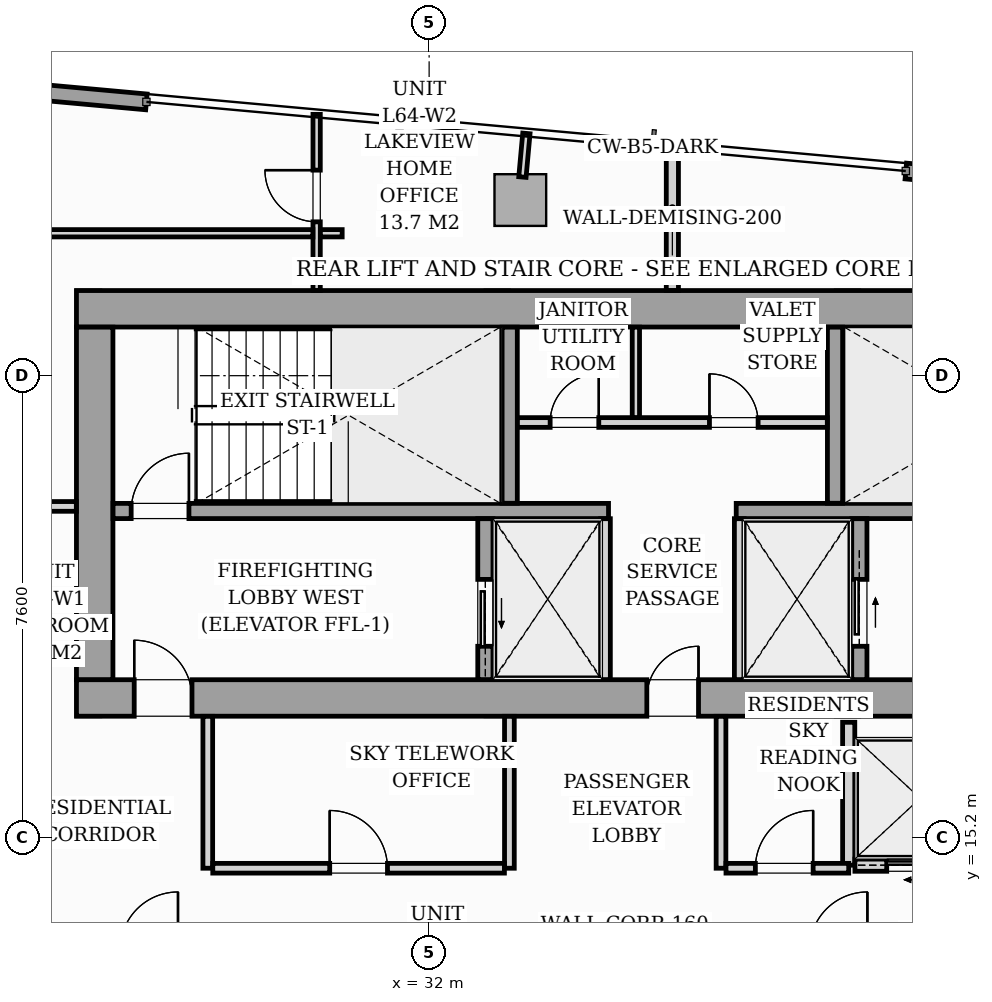
"""IFC4 building model, lengths in metres.
Left out: names, types, materials, properties, quantities, classifications, styles, units other than length and angle.
Written with IfcOpenShell. Run it as: python <this file> out.ifc"""

import sys

from ifc_helpers import new_model, si_unit, direction, frame, frame_2d, origin, origin_2d, place, context, subcontext, project, spatial, rectangle, i_section, extrude, source, transform, mapped, element, fill, save


model = new_model("IFC4")
c1 = context("Model", 3, precision=1e-05, world=origin(), true_north=direction((0.0, 1.0)))
c2 = subcontext(c1, "Body", "Model", "MODEL_VIEW")
j1 = project(units=[si_unit("LENGTHUNIT", "METRE"), si_unit("PLANEANGLEUNIT", "RADIAN")], contexts=[c1])
p1 = place(None, origin())
s1 = spatial("IfcSite", under=j1, at=p1, CompositionType="ELEMENT")
p2 = place(p1, origin())
s2 = spatial("IfcBuilding", under=s1, at=p2, CompositionType="ELEMENT")
p3 = place(p2, frame((0.0, 0.0, 223.2)))
s3 = spatial("IfcBuildingStorey", under=s2, at=p3, CompositionType="ELEMENT", Elevation=223.2)
m1 = source(origin(), c2, "Body", "SweptSolid", [
    extrude(i_section(OverallWidth=0.409, OverallDepth=0.425, WebThickness=0.033, FlangeThickness=0.052, FilletRadius=0.018, at=origin_2d()), origin(), (0.0, 0.0, 1.0), 3.296),
])
for number, where, z_axis, x_axis in (
    (1, (26.4, 17.4, 0.002), (0.0, 0.0, 1.0), (1.0, 0.0, 0.0)),
    (2, (33.12, 17.4, 0.002), (0.0, 0.0, 1.0), (1.0, 0.0, 0.0)),
    (3, (38.88, 17.4, 0.002), (0.0, 0.0, 1.0), (1.0, 0.0, 0.0)),
    (4, (26.4, 24.0, 0.002), (0.0, 0.0, 1.0), (1.0, 0.0, 0.0)),
    (5, (33.12, 24.0, 0.002), (0.0, 0.0, 1.0), (1.0, 0.0, 0.0)),
    (6, (38.88, 24.0, 0.002), (0.0, 0.0, 1.0), (1.0, 0.0, 0.0)),
):
    element("IfcColumn", number, at=place(p3, frame(where, z_axis=z_axis, x_axis=x_axis)), inside=s3, PredefinedType="PILASTER", context=c2, shape_type="MappedRepresentation", body=[
        mapped(m1, transform((0.0, 0.0, 0.0), scale=1.0)),
    ])
m2 = source(origin(), c2, "Body", "SweptSolid", [
    extrude(rectangle(XDim=0.85, YDim=0.85, at=origin_2d()), origin(), (0.0, 0.0, 1.0), 3.296),
])
p4 = place(p3, frame((33.5, 25.688, 0.002), z_axis=(0.0, 0.0, 1.0), x_axis=(0.995884398616, -0.090632580198, 0.0)))
e7 = element("IfcColumn", 7, at=p4, inside=s3, PredefinedType="COLUMN", context=c2, shape_type="MappedRepresentation", body=[
    mapped(m2, transform((0.0, 0.0, 0.0), scale=1.0)),
])
p5 = place(p3, frame((12.781, 28.628, 0.0), z_axis=(0.0, 0.0, 1.0), x_axis=(0.995884584572, -0.090630536861, 0.0)))
e8 = element("IfcWall", 8, at=p5, inside=s3, PredefinedType="STANDARD", context=c2, shape_type="SweptSolid", body=[
    extrude(rectangle(XDim=14.63, YDim=0.26, at=frame_2d((7.315, 0.0))), origin(), (0.0, 0.0, 1.0), 3.04),
])
p6 = place(p5, frame((4.159, 0.0, 0.0)))
e9 = element("IfcOpeningElement", 9, at=p6, cuts=e8, PredefinedType="OPENING", context=c2, shape_type="SweptSolid", body=[
    extrude(rectangle(XDim=1.8, YDim=2.06, at=frame_2d((0.9, 1.03))), frame((0.0, 0.14, 0.0), z_axis=(0.0, -1.0, 0.0), x_axis=(1.0, 0.0, 0.0)), (0.0, 0.0, 1.0), 0.28),
])
p7 = place(p5, frame((7.9, 0.0, 0.65)))
e10 = element("IfcOpeningElement", 10, at=p7, cuts=e8, PredefinedType="OPENING", context=c2, shape_type="SweptSolid", body=[
    extrude(rectangle(XDim=1.6, YDim=1.5, at=frame_2d((0.8, 0.75))), frame((0.0, 0.14, 0.0), z_axis=(0.0, -1.0, 0.0), x_axis=(1.0, 0.0, 0.0)), (0.0, 0.0, 1.0), 0.28),
])
p8 = place(p3, frame((39.839, 26.166, 0.0), z_axis=(0.0, 0.0, 1.0), x_axis=(0.995884447498, -0.090632043071, 0.0)))
e11 = element("IfcWall", 11, at=p8, inside=s3, PredefinedType="STANDARD", context=c2, shape_type="SweptSolid", body=[
    extrude(rectangle(XDim=14.63, YDim=0.26, at=frame_2d((7.315, 0.0))), origin(), (0.0, 0.0, 1.0), 3.04),
])
p9 = place(p8, frame((7.57, 0.0, 0.0)))
e12 = element("IfcOpeningElement", 12, at=p9, cuts=e11, PredefinedType="OPENING", context=c2, shape_type="SweptSolid", body=[
    extrude(rectangle(XDim=1.8, YDim=2.06, at=frame_2d((0.9, 1.03))), frame((0.0, 0.14, 0.0), z_axis=(0.0, -1.0, 0.0), x_axis=(1.0, 0.0, 0.0)), (0.0, 0.0, 1.0), 0.28),
])
p10 = place(p8, frame((0.7, 0.0, 0.65)))
e13 = element("IfcOpeningElement", 13, at=p10, cuts=e11, PredefinedType="OPENING", context=c2, shape_type="SweptSolid", body=[
    extrude(rectangle(XDim=1.6, YDim=1.5, at=frame_2d((0.8, 0.75))), frame((0.0, 0.14, 0.0), z_axis=(0.0, -1.0, 0.0), x_axis=(1.0, 0.0, 0.0)), (0.0, 0.0, 1.0), 0.28),
])
p11 = place(p3, frame((26.2, 17.5, 0.0), z_axis=(0.0, 0.0, 1.0), x_axis=(1.0, 0.0, 0.0)))
e14 = element("IfcWall", 14, at=p11, inside=s3, PredefinedType="SHEAR", context=c2, shape_type="SweptSolid", body=[
    extrude(rectangle(XDim=19.6, YDim=0.6, at=frame_2d((9.8, 0.0))), origin(), (0.0, 0.0, 1.0), 3.3),
])
p12 = place(p11, frame((0.95, 0.0, 0.0)))
e15 = element("IfcOpeningElement", 15, at=p12, cuts=e14, PredefinedType="OPENING", context=c2, shape_type="SweptSolid", body=[
    extrude(rectangle(XDim=0.95, YDim=2.06, at=frame_2d((0.475, 1.03))), frame((0.0, 0.31, 0.0), z_axis=(0.0, -1.0, 0.0), x_axis=(1.0, 0.0, 0.0)), (0.0, 0.0, 1.0), 0.62),
])
p13 = place(p11, frame((9.38, 0.0, 0.0)))
e16 = element("IfcOpeningElement", 16, at=p13, cuts=e14, PredefinedType="OPENING", context=c2, shape_type="SweptSolid", body=[
    extrude(rectangle(XDim=0.85, YDim=2.0, at=frame_2d((0.425, 1.0))), frame((0.0, 0.31, 0.0), z_axis=(0.0, -1.0, 0.0), x_axis=(1.0, 0.0, 0.0)), (0.0, 0.0, 1.0), 0.62),
])
p14 = place(p11, frame((17.55, 0.0, 0.0)))
e17 = element("IfcOpeningElement", 17, at=p14, cuts=e14, PredefinedType="OPENING", context=c2, shape_type="SweptSolid", body=[
    extrude(rectangle(XDim=0.95, YDim=2.06, at=frame_2d((0.475, 1.03))), frame((0.0, 0.31, 0.0), z_axis=(0.0, -1.0, 0.0), x_axis=(1.0, 0.0, 0.0)), (0.0, 0.0, 1.0), 0.62),
])
p15 = place(p3, frame((26.2, 23.9, 0.0), z_axis=(0.0, 0.0, 1.0), x_axis=(1.0, 0.0, 0.0)))
e18 = element("IfcWall", 18, at=p15, inside=s3, PredefinedType="SHEAR", context=c2, shape_type="SweptSolid", body=[
    extrude(rectangle(XDim=19.6, YDim=0.6, at=frame_2d((9.8, 0.0))), origin(), (0.0, 0.0, 1.0), 3.3),
])
p16 = place(p3, frame((26.5, 17.802, 0.0), z_axis=(0.0, 0.0, 1.0), x_axis=(0.0, 1.0, 0.0)))
e19 = element("IfcWall", 19, at=p16, inside=s3, PredefinedType="SHEAR", context=c2, shape_type="SweptSolid", body=[
    extrude(rectangle(XDim=5.796, YDim=0.6, at=frame_2d((2.898, 0.0))), origin(), (0.0, 0.0, 1.0), 3.3),
])
p17 = place(p3, frame((26.802, 20.575, 0.0), z_axis=(0.0, 0.0, 1.0), x_axis=(1.0, 0.0, 0.0)))
e20 = element("IfcWall", 20, at=p17, inside=s3, PredefinedType="SOLIDWALL", context=c2, shape_type="SweptSolid", body=[
    extrude(rectangle(XDim=8.148, YDim=0.25, at=frame_2d((4.074, 0.0))), origin(), (0.0, 0.0, 1.0), 3.3),
])
p18 = place(p17, frame((0.298, 0.0, 0.0)))
e21 = element("IfcOpeningElement", 21, at=p18, cuts=e20, PredefinedType="OPENING", context=c2, shape_type="SweptSolid", body=[
    extrude(rectangle(XDim=0.95, YDim=2.06, at=frame_2d((0.475, 1.03))), frame((0.0, 0.135, 0.0), z_axis=(0.0, -1.0, 0.0), x_axis=(1.0, 0.0, 0.0)), (0.0, 0.0, 1.0), 0.27),
])
p19 = place(p3, frame((37.05, 20.575, 0.0), z_axis=(0.0, 0.0, 1.0), x_axis=(1.0, 0.0, 0.0)))
e22 = element("IfcWall", 22, at=p19, inside=s3, PredefinedType="SOLIDWALL", context=c2, shape_type="SweptSolid", body=[
    extrude(rectangle(XDim=8.148, YDim=0.25, at=frame_2d((4.074, 0.0))), origin(), (0.0, 0.0, 1.0), 3.3),
])
p20 = place(p19, frame((6.6, 0.0, 0.0)))
e23 = element("IfcOpeningElement", 23, at=p20, cuts=e22, PredefinedType="OPENING", context=c2, shape_type="SweptSolid", body=[
    extrude(rectangle(XDim=0.95, YDim=2.06, at=frame_2d((0.475, 1.03))), frame((0.0, 0.135, 0.0), z_axis=(0.0, -1.0, 0.0), x_axis=(1.0, 0.0, 0.0)), (0.0, 0.0, 1.0), 0.27),
])
for number, where, z_axis, x_axis in (
    (24, (33.325, 20.702, 0.0), (0.0, 0.0, 1.0), (0.0, 1.0, 0.0)),
    (25, (38.675, 20.702, 0.0), (0.0, 0.0, 1.0), (0.0, 1.0, 0.0)),
):
    element("IfcWall", number, at=place(p3, frame(where, z_axis=z_axis, x_axis=x_axis)), inside=s3, PredefinedType="SOLIDWALL", context=c2, shape_type="SweptSolid", body=[
        extrude(rectangle(XDim=2.896, YDim=0.25, at=frame_2d((1.448, 0.0))), origin(), (0.0, 0.0, 1.0), 3.3),
    ])
p21 = place(p3, frame((32.925, 17.802, 0.0), z_axis=(0.0, 0.0, 1.0), x_axis=(0.0, 1.0, 0.0)))
e26 = element("IfcWall", 26, at=p21, inside=s3, PredefinedType="SOLIDWALL", context=c2, shape_type="SweptSolid", body=[
    extrude(rectangle(XDim=2.646, YDim=0.25, at=frame_2d((1.323, 0.0))), origin(), (0.0, 0.0, 1.0), 3.3),
])
p22 = place(p21, frame((0.548, 0.0, 0.0)))
e27 = element("IfcOpeningElement", 27, at=p22, cuts=e26, PredefinedType="OPENING", context=c2, shape_type="SweptSolid", body=[
    extrude(rectangle(XDim=1.1, YDim=2.08, at=frame_2d((0.55, 1.04))), frame((0.0, 0.135, 0.0), z_axis=(0.0, -1.0, 0.0), x_axis=(1.0, 0.0, 0.0)), (0.0, 0.0, 1.0), 0.27),
])
for number, where, z_axis, x_axis in (
    (28, (34.9, 17.802, 0.0), (0.0, 0.0, 1.0), (0.0, 1.0, 0.0)),
    (29, (37.1, 17.802, 0.0), (0.0, 0.0, 1.0), (0.0, 1.0, 0.0)),
):
    element("IfcWall", number, at=place(p3, frame(where, z_axis=z_axis, x_axis=x_axis)), inside=s3, PredefinedType="PARTITIONING", context=c2, shape_type="SweptSolid", body=[
        extrude(rectangle(XDim=2.646, YDim=0.16, at=frame_2d((1.323, 0.0))), origin(), (0.0, 0.0, 1.0), 3.04),
    ])
p23 = place(p3, frame((39.075, 17.802, 0.0), z_axis=(0.0, 0.0, 1.0), x_axis=(0.0, 1.0, 0.0)))
e30 = element("IfcWall", 30, at=p23, inside=s3, PredefinedType="SOLIDWALL", context=c2, shape_type="SweptSolid", body=[
    extrude(rectangle(XDim=2.646, YDim=0.25, at=frame_2d((1.323, 0.0))), origin(), (0.0, 0.0, 1.0), 3.3),
])
p24 = place(p23, frame((0.548, 0.0, 0.0)))
e31 = element("IfcOpeningElement", 31, at=p24, cuts=e30, PredefinedType="OPENING", context=c2, shape_type="SweptSolid", body=[
    extrude(rectangle(XDim=1.1, YDim=2.08, at=frame_2d((0.55, 1.04))), frame((0.0, 0.135, 0.0), z_axis=(0.0, -1.0, 0.0), x_axis=(1.0, 0.0, 0.0)), (0.0, 0.0, 1.0), 0.27),
])
p25 = place(p3, frame((33.452, 22.03, 0.0), z_axis=(0.0, 0.0, 1.0), x_axis=(1.0, 0.0, 0.0)))
e32 = element("IfcWall", 32, at=p25, inside=s3, PredefinedType="PARTITIONING", context=c2, shape_type="SweptSolid", body=[
    extrude(rectangle(XDim=5.096, YDim=0.16, at=frame_2d((2.548, 0.0))), origin(), (0.0, 0.0, 1.0), 3.04),
])
p26 = place(p25, frame((0.538, 0.0, 0.0)))
e33 = element("IfcOpeningElement", 33, at=p26, cuts=e32, PredefinedType="OPENING", context=c2, shape_type="SweptSolid", body=[
    extrude(rectangle(XDim=0.8, YDim=2.05, at=frame_2d((0.4, 1.025))), frame((0.0, 0.09, 0.0), z_axis=(0.0, -1.0, 0.0), x_axis=(1.0, 0.0, 0.0)), (0.0, 0.0, 1.0), 0.18),
])
p27 = place(p25, frame((3.158, 0.0, 0.0)))
e34 = element("IfcOpeningElement", 34, at=p27, cuts=e32, PredefinedType="OPENING", context=c2, shape_type="SweptSolid", body=[
    extrude(rectangle(XDim=0.8, YDim=2.05, at=frame_2d((0.4, 1.025))), frame((0.0, 0.09, 0.0), z_axis=(0.0, -1.0, 0.0), x_axis=(1.0, 0.0, 0.0)), (0.0, 0.0, 1.0), 0.18),
])
p28 = place(p3, frame((35.4, 22.112, 0.0), z_axis=(0.0, 0.0, 1.0), x_axis=(0.0, 1.0, 0.0)))
e35 = element("IfcWall", 35, at=p28, inside=s3, PredefinedType="PARTITIONING", context=c2, shape_type="SweptSolid", body=[
    extrude(rectangle(XDim=1.486, YDim=0.12, at=frame_2d((0.743, 0.0))), origin(), (0.0, 0.0, 1.0), 3.04),
])
p29 = place(p3, frame((38.9, 14.75, 0.0), z_axis=(0.0, 0.0, 1.0), x_axis=(0.0, 1.0, 0.0)))
e36 = element("IfcWall", 36, at=p29, inside=s3, PredefinedType="PARTITIONING", context=c2, shape_type="SweptSolid", body=[
    extrude(rectangle(XDim=2.35, YDim=0.2, at=frame_2d((1.175, 0.0))), origin(), (0.0, 0.0, 1.0), 3.04),
])
p30 = place(p3, frame((39.002, 14.75, 0.0), z_axis=(0.0, 0.0, 1.0), x_axis=(1.0, 0.0, 0.0)))
e37 = element("IfcWall", 37, at=p30, inside=s3, PredefinedType="PARTITIONING", context=c2, shape_type="SweptSolid", body=[
    extrude(rectangle(XDim=2.146, YDim=0.2, at=frame_2d((1.073, 0.0))), origin(), (0.0, 0.0, 1.0), 3.04),
])
p31 = place(p30, frame((0.523, 0.0, 0.0)))
e38 = element("IfcOpeningElement", 38, at=p31, cuts=e37, PredefinedType="OPENING", context=c2, shape_type="SweptSolid", body=[
    extrude(rectangle(XDim=1.05, YDim=2.08, at=frame_2d((0.525, 1.04))), frame((0.0, 0.11, 0.0), z_axis=(0.0, -1.0, 0.0), x_axis=(1.0, 0.0, 0.0)), (0.0, 0.0, 1.0), 0.22),
])
p32 = place(p3, frame((36.0, 24.202, 0.0), z_axis=(0.0, 0.0, 1.0), x_axis=(0.0, 1.0, 0.0)))
e39 = element("IfcWall", 39, at=p32, inside=s3, PredefinedType="PARTITIONING", context=c2, shape_type="SweptSolid", body=[
    extrude(rectangle(XDim=2.363, YDim=0.2, at=frame_2d((1.182, 0.0))), origin(), (0.0, 0.0, 1.0), 3.04),
])
p33 = place(p3, frame((24.632, 20.65, 0.0), z_axis=(0.0, 0.0, 1.0), x_axis=(1.0, 0.0, 0.0)))
e40 = element("IfcWall", 40, at=p33, inside=s3, PredefinedType="PARTITIONING", context=c2, shape_type="SweptSolid", body=[
    extrude(rectangle(XDim=1.566, YDim=0.16, at=frame_2d((0.783, 0.0))), origin(), (0.0, 0.0, 1.0), 3.04),
])
p34 = place(p3, frame((30.15, 24.202, 0.0), z_axis=(0.0, 0.0, 1.0), x_axis=(0.0, 1.0, 0.0)))
e41 = element("IfcWall", 41, at=p34, inside=s3, PredefinedType="PARTITIONING", context=c2, shape_type="SweptSolid", body=[
    extrude(rectangle(XDim=2.896, YDim=0.12, at=frame_2d((1.448, 0.0))), origin(), (0.0, 0.0, 1.0), 3.04),
])
p35 = place(p34, frame((1.128, 0.0, 0.0)))
e42 = element("IfcOpeningElement", 42, at=p35, cuts=e41, PredefinedType="OPENING", context=c2, shape_type="SweptSolid", body=[
    extrude(rectangle(XDim=0.85, YDim=2.05, at=frame_2d((0.425, 1.025))), frame((0.0, 0.07, 0.0), z_axis=(0.0, -1.0, 0.0), x_axis=(1.0, 0.0, 0.0)), (0.0, 0.0, 1.0), 0.14),
])
p36 = place(p3, frame((20.107, 25.142, 0.0), z_axis=(0.0, 0.0, 1.0), x_axis=(1.0, 0.0, 0.0)))
e43 = element("IfcWall", 43, at=p36, inside=s3, PredefinedType="PARTITIONING", context=c2, shape_type="SweptSolid", body=[
    extrude(rectangle(XDim=9.981, YDim=0.12, at=frame_2d((4.99, 0.0))), origin(), (0.0, 0.0, 1.0), 3.04),
])
p37 = place(p36, frame((4.526, 0.0, 0.0)))
e44 = element("IfcOpeningElement", 44, at=p37, cuts=e43, PredefinedType="OPENING", context=c2, shape_type="SweptSolid", body=[
    extrude(rectangle(XDim=0.85, YDim=2.05, at=frame_2d((0.425, 1.025))), frame((0.0, 0.07, 0.0), z_axis=(0.0, -1.0, 0.0), x_axis=(1.0, 0.0, 0.0)), (0.0, 0.0, 1.0), 0.14),
])
p38 = place(p3, frame((30.212, 25.142, 0.0), z_axis=(0.0, 0.0, 1.0), x_axis=(1.0, 0.0, 0.0)))
e45 = element("IfcWall", 45, at=p38, inside=s3, PredefinedType="PARTITIONING", context=c2, shape_type="SweptSolid", body=[
    extrude(rectangle(XDim=0.358, YDim=0.12, at=frame_2d((0.179, 0.0))), origin(), (0.0, 0.0, 1.0), 3.04),
])
for number, where, z_axis, x_axis in (
    (46, (28.36, 14.7, 0.0), (0.0, 0.0, 1.0), (0.0, 1.0, 0.0)),
    (47, (33.32, 14.7, 0.0), (0.0, 0.0, 1.0), (0.0, 1.0, 0.0)),
):
    element("IfcWall", number, at=place(p3, frame(where, z_axis=z_axis, x_axis=x_axis)), inside=s3, PredefinedType="PARTITIONING", context=c2, shape_type="SweptSolid", body=[
        extrude(rectangle(XDim=2.498, YDim=0.16, at=frame_2d((1.249, 0.0))), origin(), (0.0, 0.0, 1.0), 3.04),
    ])
p39 = place(p3, frame((28.442, 14.7, 0.0), z_axis=(0.0, 0.0, 1.0), x_axis=(1.0, 0.0, 0.0)))
e48 = element("IfcWall", 48, at=p39, inside=s3, PredefinedType="PARTITIONING", context=c2, shape_type="SweptSolid", body=[
    extrude(rectangle(XDim=4.796, YDim=0.16, at=frame_2d((2.398, 0.0))), origin(), (0.0, 0.0, 1.0), 2.596),
])
p40 = place(p39, frame((1.923, 0.0, 0.0)))
e49 = element("IfcOpeningElement", 49, at=p40, cuts=e48, PredefinedType="OPENING", context=c2, shape_type="SweptSolid", body=[
    extrude(rectangle(XDim=0.95, YDim=2.06, at=frame_2d((0.475, 1.03))), frame((0.0, 0.09, 0.0), z_axis=(0.0, -1.0, 0.0), x_axis=(1.0, 0.0, 0.0)), (0.0, 0.0, 1.0), 0.18),
])
p41 = place(p3, frame((36.8, 14.7, 0.0), z_axis=(0.0, 0.0, 1.0), x_axis=(0.0, 1.0, 0.0)))
e50 = element("IfcWall", 50, at=p41, inside=s3, PredefinedType="PARTITIONING", context=c2, shape_type="SweptSolid", body=[
    extrude(rectangle(XDim=2.498, YDim=0.16, at=frame_2d((1.249, 0.0))), origin(), (0.0, 0.0, 1.0), 3.04),
])
p42 = place(p3, frame((36.882, 14.7, 0.0), z_axis=(0.0, 0.0, 1.0), x_axis=(1.0, 0.0, 0.0)))
e51 = element("IfcWall", 51, at=p42, inside=s3, PredefinedType="PARTITIONING", context=c2, shape_type="SweptSolid", body=[
    extrude(rectangle(XDim=2.018, YDim=0.16, at=frame_2d((1.009, 0.0))), origin(), (0.0, 0.0, 1.0), 3.04),
])
p43 = place(p42, frame((0.483, 0.0, 0.0)))
e52 = element("IfcOpeningElement", 52, at=p43, cuts=e51, PredefinedType="OPENING", context=c2, shape_type="SweptSolid", body=[
    extrude(rectangle(XDim=0.95, YDim=2.06, at=frame_2d((0.475, 1.03))), frame((0.0, 0.09, 0.0), z_axis=(0.0, -1.0, 0.0), x_axis=(1.0, 0.0, 0.0)), (0.0, 0.0, 1.0), 0.18),
])
p44 = place(p3, frame((33.534, 26.067, 0.0), z_axis=(0.0, 0.0, 1.0), x_axis=(0.090535746043, 0.995893206468, 0.0)))
e53 = element("IfcWall", 53, at=p44, inside=s3, PredefinedType="PARTITIONING", context=c2, shape_type="SweptSolid", body=[
    extrude(rectangle(XDim=0.72, YDim=0.12, at=frame_2d((0.36, 0.0))), origin(), (0.0, 0.0, 1.0), 3.04),
])
m3 = source(origin(), c2, "Body", "SweptSolid", [
    extrude(rectangle(XDim=0.95, YDim=2.06, at=frame_2d((0.475, 1.03))), frame((0.0, 0.025, 0.0), z_axis=(0.0, -1.0, 0.0), x_axis=(1.0, 0.0, 0.0)), (0.0, 0.0, 1.0), 0.05),
])
p45 = place(p12, origin())
e54 = element("IfcDoor", 54, at=p45, inside=s3, OperationType="SINGLE_SWING_LEFT", PredefinedType="DOOR", context=c2, shape_type="MappedRepresentation", body=[
    mapped(m3, transform((0.0, 0.0, 0.0), scale=1.0)),
])
fill(e15, e54)
m4 = source(origin(), c2, "Body", "SweptSolid", [
    extrude(rectangle(XDim=0.85, YDim=2.0, at=frame_2d((0.425, 1.0))), frame((0.0, 0.025, 0.0), z_axis=(0.0, -1.0, 0.0), x_axis=(1.0, 0.0, 0.0)), (0.0, 0.0, 1.0), 0.05),
])
p46 = place(p13, origin())
e55 = element("IfcDoor", 55, at=p46, inside=s3, OperationType="SINGLE_SWING_RIGHT", PredefinedType="DOOR", context=c2, shape_type="MappedRepresentation", body=[
    mapped(m4, transform((0.0, 0.0, 0.0), scale=1.0)),
])
fill(e16, e55)
p47 = place(p18, origin())
e56 = element("IfcDoor", 56, at=p47, inside=s3, OperationType="SINGLE_SWING_RIGHT", PredefinedType="DOOR", context=c2, shape_type="MappedRepresentation", body=[
    mapped(m3, transform((0.0, 0.0, 0.0), scale=1.0)),
])
fill(e21, e56)
m5 = source(origin(), c2, "Body", "SweptSolid", [
    extrude(rectangle(XDim=1.1, YDim=2.08, at=frame_2d((0.55, 1.04))), frame((0.0, 0.025, 0.0), z_axis=(0.0, -1.0, 0.0), x_axis=(1.0, 0.0, 0.0)), (0.0, 0.0, 1.0), 0.05),
])
p48 = place(p22, origin())
e57 = element("IfcDoor", 57, at=p48, inside=s3, OperationType="SLIDING_TO_LEFT", PredefinedType="DOOR", context=c2, shape_type="MappedRepresentation", body=[
    mapped(m5, transform((0.0, 0.0, 0.0), scale=1.0)),
])
fill(e27, e57)
p49 = place(p24, origin())
e58 = element("IfcDoor", 58, at=p49, inside=s3, OperationType="SLIDING_TO_RIGHT", PredefinedType="DOOR", context=c2, shape_type="MappedRepresentation", body=[
    mapped(m5, transform((0.0, 0.0, 0.0), scale=1.0)),
])
fill(e31, e58)
m6 = source(origin(), c2, "Body", "SweptSolid", [
    extrude(rectangle(XDim=0.8, YDim=2.05, at=frame_2d((0.4, 1.025))), frame((0.0, 0.025, 0.0), z_axis=(0.0, -1.0, 0.0), x_axis=(1.0, 0.0, 0.0)), (0.0, 0.0, 1.0), 0.05),
])
p50 = place(p26, origin())
e59 = element("IfcDoor", 59, at=p50, inside=s3, OperationType="SINGLE_SWING_RIGHT", PredefinedType="DOOR", context=c2, shape_type="MappedRepresentation", body=[
    mapped(m6, transform((0.0, 0.0, 0.0), scale=1.0)),
])
fill(e33, e59)
p51 = place(p27, origin())
e60 = element("IfcDoor", 60, at=p51, inside=s3, OperationType="SINGLE_SWING_LEFT", PredefinedType="DOOR", context=c2, shape_type="MappedRepresentation", body=[
    mapped(m6, transform((0.0, 0.0, 0.0), scale=1.0)),
])
fill(e34, e60)
m7 = source(origin(), c2, "Body", "SweptSolid", [
    extrude(rectangle(XDim=1.05, YDim=2.08, at=frame_2d((0.525, 1.04))), frame((0.0, 0.025, 0.0), z_axis=(0.0, -1.0, 0.0), x_axis=(1.0, 0.0, 0.0)), (0.0, 0.0, 1.0), 0.05),
])
p52 = place(p31, origin())
e61 = element("IfcDoor", 61, at=p52, inside=s3, OperationType="SLIDING_TO_LEFT", PredefinedType="DOOR", context=c2, shape_type="MappedRepresentation", body=[
    mapped(m7, transform((0.0, 0.0, 0.0), scale=1.0)),
])
fill(e38, e61)
m8 = source(origin(), c2, "Body", "SweptSolid", [
    extrude(rectangle(XDim=0.85, YDim=2.05, at=frame_2d((0.425, 1.025))), frame((0.0, 0.025, 0.0), z_axis=(0.0, -1.0, 0.0), x_axis=(1.0, 0.0, 0.0)), (0.0, 0.0, 1.0), 0.05),
])
p53 = place(p35, origin())
e62 = element("IfcDoor", 62, at=p53, inside=s3, OperationType="SINGLE_SWING_RIGHT", PredefinedType="DOOR", context=c2, shape_type="MappedRepresentation", body=[
    mapped(m8, transform((0.0, 0.0, 0.0), scale=1.0)),
])
fill(e42, e62)
m9 = source(origin(), c2, "Body", "SweptSolid", [
    extrude(rectangle(XDim=0.95, YDim=2.06, at=frame_2d((0.475, 1.03))), frame((0.0, 0.025, 0.0), z_axis=(0.0, -1.0, 0.0), x_axis=(1.0, 0.0, 0.0)), (0.0, 0.0, 1.0), 0.05),
])
p54 = place(p40, origin())
e63 = element("IfcDoor", 63, at=p54, inside=s3, OperationType="SINGLE_SWING_LEFT", PredefinedType="DOOR", context=c2, shape_type="MappedRepresentation", body=[
    mapped(m9, transform((0.0, 0.0, 0.0), scale=1.0)),
])
fill(e49, e63)
p55 = place(p43, origin())
e64 = element("IfcDoor", 64, at=p55, inside=s3, OperationType="SINGLE_SWING_RIGHT", PredefinedType="DOOR", context=c2, shape_type="MappedRepresentation", body=[
    mapped(m9, transform((0.0, 0.0, 0.0), scale=1.0)),
])
fill(e52, e64)
save(model, sys.argv[1])
